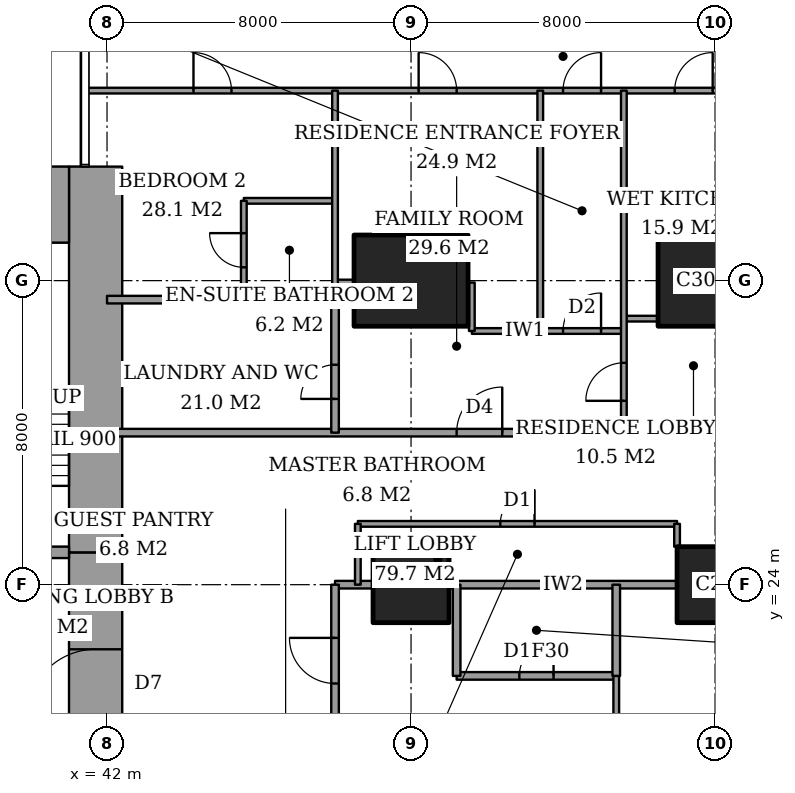
"""IFC4 building model, lengths in metres.
Left out: names, types, materials, properties, quantities, classifications, styles, units other than length and angle.
Written with IfcOpenShell. Run it as: python <this file> out.ifc"""

import sys

from ifc_helpers import new_model, si_unit, direction, frame, frame_2d, origin, origin_2d, place, context, subcontext, project, spatial, rectangle, extrude, element, fill, save


model = new_model("IFC4")
c1 = context("Model", 3, precision=1e-05, world=origin(), true_north=direction((0.0, 1.0)))
c2 = subcontext(c1, "Body", "Model", "MODEL_VIEW")
j1 = project(units=[si_unit("LENGTHUNIT", "METRE"), si_unit("PLANEANGLEUNIT", "RADIAN")], contexts=[c1])
p1 = place(None, origin())
s1 = spatial("IfcSite", under=j1, at=p1, CompositionType="ELEMENT")
p2 = place(p1, origin())
s2 = spatial("IfcBuilding", under=s1, at=p2, CompositionType="ELEMENT")
p3 = place(p2, frame((0.0, 0.0, 51.2)))
s3 = spatial("IfcBuildingStorey", under=s2, at=p3, CompositionType="ELEMENT", Elevation=51.2)
p4 = place(p3, frame((50.0, 24.0, 0.0), z_axis=(0.0, 0.0, 1.0), x_axis=(1.0, 0.0, 0.0)))
e1 = element("IfcColumn", 1, at=p4, inside=s3, PredefinedType="COLUMN", context=c2, shape_type="SweptSolid", body=[
    extrude(rectangle(XDim=2.0, YDim=2.0, at=origin_2d()), origin(), (0.0, 0.0, 1.0), 3.6),
])
p5 = place(p3, frame((50.0, 32.0, 0.0), z_axis=(0.0, 0.0, 1.0), x_axis=(1.0, 0.0, 0.0)))
e2 = element("IfcColumn", 2, at=p5, inside=s3, PredefinedType="COLUMN", context=c2, shape_type="SweptSolid", body=[
    extrude(rectangle(XDim=3.0, YDim=2.4, at=origin_2d()), origin(), (0.0, 0.0, 1.0), 3.6),
])
p6 = place(p3, frame((58.0, 24.0, 0.0), z_axis=(0.0, 0.0, 1.0), x_axis=(1.0, 0.0, 0.0)))
e3 = element("IfcColumn", 3, at=p6, inside=s3, PredefinedType="COLUMN", context=c2, shape_type="SweptSolid", body=[
    extrude(rectangle(XDim=2.0, YDim=2.0, at=origin_2d()), origin(), (0.0, 0.0, 1.0), 3.6),
])
p7 = place(p3, frame((58.0, 32.0, 0.0), z_axis=(0.0, 0.0, 1.0), x_axis=(1.0, 0.0, 0.0)))
e4 = element("IfcColumn", 4, at=p7, inside=s3, PredefinedType="COLUMN", context=c2, shape_type="SweptSolid", body=[
    extrude(rectangle(XDim=3.0, YDim=2.4, at=origin_2d()), origin(), (0.0, 0.0, 1.0), 3.6),
])
p8 = place(p3, frame((37.85, 34.0, 0.0), z_axis=(0.0, 0.0, 1.0), x_axis=(1.0, 0.0, 0.0)))
e5 = element("IfcWall", 5, at=p8, inside=s3, PredefinedType="SHEAR", context=c2, shape_type="SweptSolid", body=[
    extrude(rectangle(XDim=3.15, YDim=2.0, at=frame_2d((1.575, 0.0))), origin(), (0.0, 0.0, 1.0), 3.6),
])
p9 = place(p3, frame((41.7, 13.0, 0.0), z_axis=(0.0, 0.0, 1.0), x_axis=(0.0, 1.0, 0.0)))
e6 = element("IfcWall", 6, at=p9, inside=s3, PredefinedType="SHEAR", context=c2, shape_type="SweptSolid", body=[
    extrude(rectangle(XDim=11.85, YDim=1.4, at=frame_2d((5.925, 0.0))), origin(), (0.0, 0.0, 1.0), 3.6),
])
p10 = place(p9, frame((7.5, 0.0, 0.0)))
e7 = element("IfcOpeningElement", 7, at=p10, cuts=e6, PredefinedType="OPENING", context=c2, shape_type="SweptSolid", body=[
    extrude(rectangle(XDim=1.8, YDim=2.4, at=frame_2d((0.9, 1.2))), frame((0.0, 0.71, 0.0), z_axis=(0.0, -1.0, 0.0), x_axis=(1.0, 0.0, 0.0)), (0.0, 0.0, 1.0), 1.42),
])
p11 = place(p3, frame((41.7, 24.85, 0.0), z_axis=(0.0, 0.0, 1.0), x_axis=(0.0, 1.0, 0.0)))
e8 = element("IfcWall", 8, at=p11, inside=s3, PredefinedType="SHEAR", context=c2, shape_type="SweptSolid", body=[
    extrude(rectangle(XDim=10.15, YDim=1.4, at=frame_2d((5.075, 0.0))), origin(), (0.0, 0.0, 1.0), 3.6),
])
p12 = place(p3, frame((37.85, 24.85, 0.0), z_axis=(0.0, 0.0, 1.0), x_axis=(1.0, 0.0, 0.0)))
e9 = element("IfcWall", 9, at=p12, inside=s3, PredefinedType="SHEAR", context=c2, shape_type="SweptSolid", body=[
    extrude(rectangle(XDim=3.15, YDim=0.3, at=frame_2d((1.575, 0.0))), origin(), (0.0, 0.0, 1.0), 3.6),
])
p13 = place(p12, frame((0.95, 0.0, 0.0)))
e10 = element("IfcOpeningElement", 10, at=p13, cuts=e9, PredefinedType="OPENING", context=c2, shape_type="SweptSolid", body=[
    extrude(rectangle(XDim=1.0, YDim=2.1, at=frame_2d((0.5, 1.05))), frame((0.0, 0.16, 0.0), z_axis=(0.0, -1.0, 0.0), x_axis=(1.0, 0.0, 0.0)), (0.0, 0.0, 1.0), 0.32),
])
p14 = place(p3, frame((51.2, 21.6, 0.0), z_axis=(0.0, 0.0, 1.0), x_axis=(1.0, 0.0, 0.0)))
e11 = element("IfcWall", 11, at=p14, inside=s3, PredefinedType="PARTITIONING", context=c2, shape_type="SweptSolid", body=[
    extrude(rectangle(XDim=4.2, YDim=0.2, at=frame_2d((2.1, 0.0))), origin(), (0.0, 0.0, 1.0), 3.35),
])
p15 = place(p14, frame((1.65, 0.0, 0.0)))
e12 = element("IfcOpeningElement", 12, at=p15, cuts=e11, PredefinedType="OPENING", context=c2, shape_type="SweptSolid", body=[
    extrude(rectangle(XDim=0.9, YDim=2.1, at=frame_2d((0.45, 1.05))), frame((0.0, 0.11, 0.0), z_axis=(0.0, -1.0, 0.0), x_axis=(1.0, 0.0, 0.0)), (0.0, 0.0, 1.0), 0.22),
])
p16 = place(p3, frame((48.0, 24.0, 0.0), z_axis=(0.0, 0.0, 1.0), x_axis=(1.0, 0.0, 0.0)))
e13 = element("IfcWall", 13, at=p16, inside=s3, PredefinedType="PARTITIONING", context=c2, shape_type="SweptSolid", body=[
    extrude(rectangle(XDim=1.0, YDim=0.2, at=frame_2d((0.5, 0.0))), origin(), (0.0, 0.0, 1.0), 3.35),
])
p17 = place(p3, frame((51.0, 24.0, 0.0), z_axis=(0.0, 0.0, 1.0), x_axis=(1.0, 0.0, 0.0)))
e14 = element("IfcWall", 14, at=p17, inside=s3, PredefinedType="PARTITIONING", context=c2, shape_type="SweptSolid", body=[
    extrude(rectangle(XDim=6.0, YDim=0.2, at=frame_2d((3.0, 0.0))), origin(), (0.0, 0.0, 1.0), 3.35),
])
p18 = place(p3, frame((48.6, 25.6, 0.0), z_axis=(0.0, 0.0, 1.0), x_axis=(1.0, 0.0, 0.0)))
e15 = element("IfcWall", 15, at=p18, inside=s3, PredefinedType="PARTITIONING", context=c2, shape_type="SweptSolid", body=[
    extrude(rectangle(XDim=8.4, YDim=0.15, at=frame_2d((4.2, 0.0))), origin(), (0.0, 0.0, 1.0), 3.35),
])
p19 = place(p18, frame((3.75, 0.0, 0.0)))
e16 = element("IfcOpeningElement", 16, at=p19, cuts=e15, PredefinedType="OPENING", context=c2, shape_type="SweptSolid", body=[
    extrude(rectangle(XDim=0.9, YDim=2.1, at=frame_2d((0.45, 1.05))), frame((0.0, 0.085, 0.0), z_axis=(0.0, -1.0, 0.0), x_axis=(1.0, 0.0, 0.0)), (0.0, 0.0, 1.0), 0.17),
])
p20 = place(p3, frame((42.0, 28.0, 0.0), z_axis=(0.0, 0.0, 1.0), x_axis=(1.0, 0.0, 0.0)))
e17 = element("IfcWall", 17, at=p20, inside=s3, PredefinedType="PARTITIONING", context=c2, shape_type="SweptSolid", body=[
    extrude(rectangle(XDim=17.275, YDim=0.2, at=frame_2d((8.637, 0.0))), origin(), (0.0, 0.0, 1.0), 3.35),
])
p21 = place(p20, frame((9.2, 0.0, 0.0)))
e18 = element("IfcOpeningElement", 18, at=p21, cuts=e17, PredefinedType="OPENING", context=c2, shape_type="SweptSolid", body=[
    extrude(rectangle(XDim=1.2, YDim=2.4, at=frame_2d((0.6, 1.2))), frame((0.0, 0.11, 0.0), z_axis=(0.0, -1.0, 0.0), x_axis=(1.0, 0.0, 0.0)), (0.0, 0.0, 1.0), 0.22),
])
p22 = place(p3, frame((51.6, 30.675, 0.0), z_axis=(0.0, 0.0, 1.0), x_axis=(1.0, 0.0, 0.0)))
e19 = element("IfcWall", 19, at=p22, inside=s3, PredefinedType="PARTITIONING", context=c2, shape_type="SweptSolid", body=[
    extrude(rectangle(XDim=4.0, YDim=0.15, at=frame_2d((2.0, 0.0))), origin(), (0.0, 0.0, 1.0), 3.35),
])
p23 = place(p22, frame((2.4, 0.0, 0.0)))
e20 = element("IfcOpeningElement", 20, at=p23, cuts=e19, PredefinedType="OPENING", context=c2, shape_type="SweptSolid", body=[
    extrude(rectangle(XDim=1.0, YDim=2.1, at=frame_2d((0.5, 1.05))), frame((0.0, 0.085, 0.0), z_axis=(0.0, -1.0, 0.0), x_axis=(1.0, 0.0, 0.0)), (0.0, 0.0, 1.0), 0.17),
])
p24 = place(p3, frame((55.6, 31.0, 0.0), z_axis=(0.0, 0.0, 1.0), x_axis=(1.0, 0.0, 0.0)))
e21 = element("IfcWall", 21, at=p24, inside=s3, PredefinedType="PARTITIONING", context=c2, shape_type="SweptSolid", body=[
    extrude(rectangle(XDim=0.9, YDim=0.15, at=frame_2d((0.45, 0.0))), origin(), (0.0, 0.0, 1.0), 3.35),
])
p25 = place(p3, frame((42.0, 31.5, 0.0), z_axis=(0.0, 0.0, 1.0), x_axis=(1.0, 0.0, 0.0)))
e22 = element("IfcWall", 22, at=p25, inside=s3, PredefinedType="PARTITIONING", context=c2, shape_type="SweptSolid", body=[
    extrude(rectangle(XDim=6.0, YDim=0.2, at=frame_2d((3.0, 0.0))), origin(), (0.0, 0.0, 1.0), 3.35),
])
p26 = place(p3, frame((48.0, 31.95, 0.0), z_axis=(0.0, 0.0, 1.0), x_axis=(1.0, 0.0, 0.0)))
e23 = element("IfcWall", 23, at=p26, inside=s3, PredefinedType="PARTITIONING", context=c2, shape_type="SweptSolid", body=[
    extrude(rectangle(XDim=0.5, YDim=0.15, at=frame_2d((0.25, 0.0))), origin(), (0.0, 0.0, 1.0), 2.634),
])
p27 = place(p3, frame((45.6, 34.1, 0.0), z_axis=(0.0, 0.0, 1.0), x_axis=(1.0, 0.0, 0.0)))
e24 = element("IfcWall", 24, at=p27, inside=s3, PredefinedType="PARTITIONING", context=c2, shape_type="SweptSolid", body=[
    extrude(rectangle(XDim=2.4, YDim=0.15, at=frame_2d((1.2, 0.0))), origin(), (0.0, 0.0, 1.0), 3.35),
])
p28 = place(p3, frame((41.439, 37.0, 0.0), z_axis=(0.0, 0.0, 1.0), x_axis=(1.0, 0.0, 0.0)))
e25 = element("IfcWall", 25, at=p28, inside=s3, PredefinedType="PARTITIONING", context=c2, shape_type="SweptSolid", body=[
    extrude(rectangle(XDim=25.011, YDim=0.15, at=frame_2d((12.505, 0.0))), origin(), (0.0, 0.0, 1.0), 3.35),
])
p29 = place(p28, frame((12.561, 0.0, 0.0)))
e26 = element("IfcOpeningElement", 26, at=p29, cuts=e25, PredefinedType="OPENING", context=c2, shape_type="SweptSolid", body=[
    extrude(rectangle(XDim=1.0, YDim=2.1, at=frame_2d((0.5, 1.05))), frame((0.0, 0.085, 0.0), z_axis=(0.0, -1.0, 0.0), x_axis=(1.0, 0.0, 0.0)), (0.0, 0.0, 1.0), 0.17),
])
p30 = place(p28, frame((20.924, 0.0, 0.0)))
e27 = element("IfcOpeningElement", 27, at=p30, cuts=e25, PredefinedType="OPENING", context=c2, shape_type="SweptSolid", body=[
    extrude(rectangle(XDim=1.0, YDim=2.1, at=frame_2d((0.5, 1.05))), frame((0.0, 0.085, 0.0), z_axis=(0.0, -1.0, 0.0), x_axis=(1.0, 0.0, 0.0)), (0.0, 0.0, 1.0), 0.17),
])
p31 = place(p28, frame((15.499, 0.0, 0.0)))
e28 = element("IfcOpeningElement", 28, at=p31, cuts=e25, PredefinedType="OPENING", context=c2, shape_type="SweptSolid", body=[
    extrude(rectangle(XDim=1.0, YDim=2.1, at=frame_2d((0.5, 1.05))), frame((0.0, 0.085, 0.0), z_axis=(0.0, -1.0, 0.0), x_axis=(1.0, 0.0, 0.0)), (0.0, 0.0, 1.0), 0.17),
])
p32 = place(p28, frame((8.761, 0.0, 0.0)))
e29 = element("IfcOpeningElement", 29, at=p32, cuts=e25, PredefinedType="OPENING", context=c2, shape_type="SweptSolid", body=[
    extrude(rectangle(XDim=1.0, YDim=2.1, at=frame_2d((0.5, 1.05))), frame((0.0, 0.085, 0.0), z_axis=(0.0, -1.0, 0.0), x_axis=(1.0, 0.0, 0.0)), (0.0, 0.0, 1.0), 0.17),
])
p33 = place(p28, frame((2.836, 0.0, 0.0)))
e30 = element("IfcOpeningElement", 30, at=p33, cuts=e25, PredefinedType="OPENING", context=c2, shape_type="SweptSolid", body=[
    extrude(rectangle(XDim=1.0, YDim=2.1, at=frame_2d((0.5, 1.05))), frame((0.0, 0.085, 0.0), z_axis=(0.0, -1.0, 0.0), x_axis=(1.0, 0.0, 0.0)), (0.0, 0.0, 1.0), 0.17),
])
p34 = place(p3, frame((45.6, 31.5, 0.0), z_axis=(0.0, 0.0, 1.0), x_axis=(0.0, 1.0, 0.0)))
e31 = element("IfcWall", 31, at=p34, inside=s3, PredefinedType="PARTITIONING", context=c2, shape_type="SweptSolid", body=[
    extrude(rectangle(XDim=2.6, YDim=0.15, at=frame_2d((1.3, 0.0))), origin(), (0.0, 0.0, 1.0), 3.35),
])
p35 = place(p34, frame((0.85, 0.0, 0.0)))
e32 = element("IfcOpeningElement", 32, at=p35, cuts=e31, PredefinedType="OPENING", context=c2, shape_type="SweptSolid", body=[
    extrude(rectangle(XDim=0.9, YDim=2.1, at=frame_2d((0.45, 1.05))), frame((0.0, 0.085, 0.0), z_axis=(0.0, -1.0, 0.0), x_axis=(1.0, 0.0, 0.0)), (0.0, 0.0, 1.0), 0.17),
])
p36 = place(p3, frame((48.0, 17.5, 0.0), z_axis=(0.0, 0.0, 1.0), x_axis=(0.0, 1.0, 0.0)))
e33 = element("IfcWall", 33, at=p36, inside=s3, PredefinedType="PARTITIONING", context=c2, shape_type="SweptSolid", body=[
    extrude(rectangle(XDim=6.5, YDim=0.2, at=frame_2d((3.25, 0.0))), origin(), (0.0, 0.0, 1.0), 3.35),
])
p37 = place(p36, frame((3.9, 0.0, 0.0)))
e34 = element("IfcOpeningElement", 34, at=p37, cuts=e33, PredefinedType="OPENING", context=c2, shape_type="SweptSolid", body=[
    extrude(rectangle(XDim=1.2, YDim=2.4, at=frame_2d((0.6, 1.2))), frame((0.0, 0.11, 0.0), z_axis=(0.0, -1.0, 0.0), x_axis=(1.0, 0.0, 0.0)), (0.0, 0.0, 1.0), 0.22),
])
p38 = place(p36, frame((0.8, 0.0, 0.0)))
e35 = element("IfcOpeningElement", 35, at=p38, cuts=e33, PredefinedType="OPENING", context=c2, shape_type="SweptSolid", body=[
    extrude(rectangle(XDim=0.9, YDim=2.1, at=frame_2d((0.45, 1.05))), frame((0.0, 0.11, 0.0), z_axis=(0.0, -1.0, 0.0), x_axis=(1.0, 0.0, 0.0)), (0.0, 0.0, 1.0), 0.22),
])
p39 = place(p3, frame((48.0, 28.0, 0.0), z_axis=(0.0, 0.0, 1.0), x_axis=(0.0, 1.0, 0.0)))
e36 = element("IfcWall", 36, at=p39, inside=s3, PredefinedType="PARTITIONING", context=c2, shape_type="SweptSolid", body=[
    extrude(rectangle(XDim=3.5, YDim=0.2, at=frame_2d((1.75, 0.0))), origin(), (0.0, 0.0, 1.0), 3.35),
])
p40 = place(p39, frame((0.887, 0.0, 0.0)))
e37 = element("IfcOpeningElement", 37, at=p40, cuts=e36, PredefinedType="OPENING", context=c2, shape_type="SweptSolid", body=[
    extrude(rectangle(XDim=0.9, YDim=2.1, at=frame_2d((0.45, 1.05))), frame((0.0, 0.11, 0.0), z_axis=(0.0, -1.0, 0.0), x_axis=(1.0, 0.0, 0.0)), (0.0, 0.0, 1.0), 0.22),
])
p41 = place(p3, frame((48.0, 31.5, 0.0), z_axis=(0.0, 0.0, 1.0), x_axis=(0.0, 1.0, 0.0)))
e38 = element("IfcWall", 38, at=p41, inside=s3, PredefinedType="PARTITIONING", context=c2, shape_type="SweptSolid", body=[
    extrude(rectangle(XDim=5.5, YDim=0.15, at=frame_2d((2.75, 0.0))), origin(), (0.0, 0.0, 1.0), 3.35),
])
p42 = place(p3, frame((48.6, 24.0, 0.0), z_axis=(0.0, 0.0, 1.0), x_axis=(0.0, 1.0, 0.0)))
e39 = element("IfcWall", 39, at=p42, inside=s3, PredefinedType="PARTITIONING", context=c2, shape_type="SweptSolid", body=[
    extrude(rectangle(XDim=1.6, YDim=0.15, at=frame_2d((0.8, 0.0))), origin(), (0.0, 0.0, 1.0), 3.35),
])
p43 = place(p3, frame((51.2, 21.6, 0.0), z_axis=(0.0, 0.0, 1.0), x_axis=(0.0, 1.0, 0.0)))
e40 = element("IfcWall", 40, at=p43, inside=s3, PredefinedType="PARTITIONING", context=c2, shape_type="SweptSolid", body=[
    extrude(rectangle(XDim=2.4, YDim=0.2, at=frame_2d((1.2, 0.0))), origin(), (0.0, 0.0, 1.0), 3.35),
])
p44 = place(p3, frame((51.6, 30.675, 0.0), z_axis=(0.0, 0.0, 1.0), x_axis=(0.0, 1.0, 0.0)))
e41 = element("IfcWall", 41, at=p44, inside=s3, PredefinedType="PARTITIONING", context=c2, shape_type="SweptSolid", body=[
    extrude(rectangle(XDim=1.275, YDim=0.15, at=frame_2d((0.637, 0.0))), origin(), (0.0, 0.0, 1.0), 3.35),
])
p45 = place(p3, frame((53.4, 30.675, 0.0), z_axis=(0.0, 0.0, 1.0), x_axis=(0.0, 1.0, 0.0)))
e42 = element("IfcWall", 42, at=p45, inside=s3, PredefinedType="PARTITIONING", context=c2, shape_type="SweptSolid", body=[
    extrude(rectangle(XDim=6.325, YDim=0.15, at=frame_2d((3.163, 0.0))), origin(), (0.0, 0.0, 1.0), 3.35),
])
p46 = place(p3, frame((55.4, 21.6, 0.0), z_axis=(0.0, 0.0, 1.0), x_axis=(0.0, 1.0, 0.0)))
e43 = element("IfcWall", 43, at=p46, inside=s3, PredefinedType="PARTITIONING", context=c2, shape_type="SweptSolid", body=[
    extrude(rectangle(XDim=2.4, YDim=0.2, at=frame_2d((1.2, 0.0))), origin(), (0.0, 0.0, 1.0), 3.35),
])
p47 = place(p3, frame((55.4, 10.8, 0.0), z_axis=(0.0, 0.0, 1.0), x_axis=(0.0, 1.0, 0.0)))
e44 = element("IfcWall", 44, at=p47, inside=s3, PredefinedType="PARTITIONING", context=c2, shape_type="SweptSolid", body=[
    extrude(rectangle(XDim=10.8, YDim=0.15, at=frame_2d((5.4, 0.0))), origin(), (0.0, 0.0, 1.0), 3.35),
])
p48 = place(p47, frame((8.25, 0.0, 0.0)))
e45 = element("IfcOpeningElement", 45, at=p48, cuts=e44, PredefinedType="OPENING", context=c2, shape_type="SweptSolid", body=[
    extrude(rectangle(XDim=1.0, YDim=2.1, at=frame_2d((0.5, 1.05))), frame((0.0, 0.085, 0.0), z_axis=(0.0, -1.0, 0.0), x_axis=(1.0, 0.0, 0.0)), (0.0, 0.0, 1.0), 0.17),
])
p49 = place(p3, frame((55.6, 28.0, 0.0), z_axis=(0.0, 0.0, 1.0), x_axis=(0.0, 1.0, 0.0)))
e46 = element("IfcWall", 46, at=p49, inside=s3, PredefinedType="PARTITIONING", context=c2, shape_type="SweptSolid", body=[
    extrude(rectangle(XDim=9.0, YDim=0.15, at=frame_2d((4.5, 0.0))), origin(), (0.0, 0.0, 1.0), 3.35),
])
p50 = place(p49, frame((0.837, 0.0, 0.0)))
e47 = element("IfcOpeningElement", 47, at=p50, cuts=e46, PredefinedType="OPENING", context=c2, shape_type="SweptSolid", body=[
    extrude(rectangle(XDim=1.0, YDim=2.1, at=frame_2d((0.5, 1.05))), frame((0.0, 0.085, 0.0), z_axis=(0.0, -1.0, 0.0), x_axis=(1.0, 0.0, 0.0)), (0.0, 0.0, 1.0), 0.17),
])
p51 = place(p3, frame((57.0, 25.0, 0.0), z_axis=(0.0, 0.0, 1.0), x_axis=(0.0, 1.0, 0.0)))
e48 = element("IfcWall", 48, at=p51, inside=s3, PredefinedType="PARTITIONING", context=c2, shape_type="SweptSolid", body=[
    extrude(rectangle(XDim=0.6, YDim=0.15, at=frame_2d((0.3, 0.0))), origin(), (0.0, 0.0, 1.0), 3.35),
])
p52 = place(p15, origin())
e49 = element("IfcDoor", 49, at=p52, inside=s3, OperationType="SINGLE_SWING_LEFT", PredefinedType="DOOR", context=c2, shape_type="SweptSolid", body=[
    extrude(rectangle(XDim=0.9, YDim=2.1, at=frame_2d((0.45, 1.05))), frame((0.0, 0.025, 0.0), z_axis=(0.0, -1.0, 0.0), x_axis=(1.0, 0.0, 0.0)), (0.0, 0.0, 1.0), 0.05),
])
fill(e12, e49)
p53 = place(p37, origin())
e50 = element("IfcDoor", 50, at=p53, inside=s3, OperationType="SINGLE_SWING_LEFT", PredefinedType="DOOR", context=c2, shape_type="SweptSolid", body=[
    extrude(rectangle(XDim=1.2, YDim=2.4, at=frame_2d((0.6, 1.2))), frame((0.0, 0.025, 0.0), z_axis=(0.0, -1.0, 0.0), x_axis=(1.0, 0.0, 0.0)), (0.0, 0.0, 1.0), 0.05),
])
fill(e34, e50)
p54 = place(p29, origin())
e51 = element("IfcDoor", 51, at=p54, inside=s3, OperationType="SINGLE_SWING_LEFT", PredefinedType="DOOR", context=c2, shape_type="SweptSolid", body=[
    extrude(rectangle(XDim=1.0, YDim=2.1, at=frame_2d((0.5, 1.05))), frame((0.0, 0.025, 0.0), z_axis=(0.0, -1.0, 0.0), x_axis=(1.0, 0.0, 0.0)), (0.0, 0.0, 1.0), 0.05),
])
fill(e26, e51)
p55 = place(p31, origin())
e52 = element("IfcDoor", 52, at=p55, inside=s3, OperationType="SINGLE_SWING_LEFT", PredefinedType="DOOR", context=c2, shape_type="SweptSolid", body=[
    extrude(rectangle(XDim=1.0, YDim=2.1, at=frame_2d((0.5, 1.05))), frame((0.0, 0.025, 0.0), z_axis=(0.0, -1.0, 0.0), x_axis=(1.0, 0.0, 0.0)), (0.0, 0.0, 1.0), 0.05),
])
fill(e28, e52)
p56 = place(p50, origin())
e53 = element("IfcDoor", 53, at=p56, inside=s3, OperationType="SINGLE_SWING_RIGHT", PredefinedType="DOOR", context=c2, shape_type="SweptSolid", body=[
    extrude(rectangle(XDim=1.0, YDim=2.1, at=frame_2d((0.5, 1.05))), frame((0.0, 0.025, 0.0), z_axis=(0.0, -1.0, 0.0), x_axis=(1.0, 0.0, 0.0)), (0.0, 0.0, 1.0), 0.05),
])
fill(e47, e53)
p57 = place(p21, origin())
e54 = element("IfcDoor", 54, at=p57, inside=s3, OperationType="SINGLE_SWING_LEFT", PredefinedType="DOOR", context=c2, shape_type="SweptSolid", body=[
    extrude(rectangle(XDim=1.2, YDim=2.4, at=frame_2d((0.6, 1.2))), frame((0.0, 0.025, 0.0), z_axis=(0.0, -1.0, 0.0), x_axis=(1.0, 0.0, 0.0)), (0.0, 0.0, 1.0), 0.05),
])
fill(e18, e54)
p58 = place(p23, origin())
e55 = element("IfcDoor", 55, at=p58, inside=s3, OperationType="SINGLE_SWING_LEFT", PredefinedType="DOOR", context=c2, shape_type="SweptSolid", body=[
    extrude(rectangle(XDim=1.0, YDim=2.1, at=frame_2d((0.5, 1.05))), frame((0.0, 0.025, 0.0), z_axis=(0.0, -1.0, 0.0), x_axis=(1.0, 0.0, 0.0)), (0.0, 0.0, 1.0), 0.05),
])
fill(e20, e55)
p59 = place(p32, origin())
e56 = element("IfcDoor", 56, at=p59, inside=s3, OperationType="SINGLE_SWING_RIGHT", PredefinedType="DOOR", context=c2, shape_type="SweptSolid", body=[
    extrude(rectangle(XDim=1.0, YDim=2.1, at=frame_2d((0.5, 1.05))), frame((0.0, 0.025, 0.0), z_axis=(0.0, -1.0, 0.0), x_axis=(1.0, 0.0, 0.0)), (0.0, 0.0, 1.0), 0.05),
])
fill(e29, e56)
p60 = place(p35, origin())
e57 = element("IfcDoor", 57, at=p60, inside=s3, OperationType="SINGLE_SWING_LEFT", PredefinedType="DOOR", context=c2, shape_type="SweptSolid", body=[
    extrude(rectangle(XDim=0.9, YDim=2.1, at=frame_2d((0.45, 1.05))), frame((0.0, 0.025, 0.0), z_axis=(0.0, -1.0, 0.0), x_axis=(1.0, 0.0, 0.0)), (0.0, 0.0, 1.0), 0.05),
])
fill(e32, e57)
p61 = place(p33, origin())
e58 = element("IfcDoor", 58, at=p61, inside=s3, OperationType="SINGLE_SWING_RIGHT", PredefinedType="DOOR", context=c2, shape_type="SweptSolid", body=[
    extrude(rectangle(XDim=1.0, YDim=2.1, at=frame_2d((0.5, 1.05))), frame((0.0, 0.025, 0.0), z_axis=(0.0, -1.0, 0.0), x_axis=(1.0, 0.0, 0.0)), (0.0, 0.0, 1.0), 0.05),
])
fill(e30, e58)
p62 = place(p40, origin())
e59 = element("IfcDoor", 59, at=p62, inside=s3, OperationType="SINGLE_SWING_RIGHT", PredefinedType="DOOR", context=c2, shape_type="SweptSolid", body=[
    extrude(rectangle(XDim=0.9, YDim=2.1, at=frame_2d((0.45, 1.05))), frame((0.0, 0.025, 0.0), z_axis=(0.0, -1.0, 0.0), x_axis=(1.0, 0.0, 0.0)), (0.0, 0.0, 1.0), 0.05),
])
fill(e37, e59)
p63 = place(p19, origin())
e60 = element("IfcDoor", 60, at=p63, inside=s3, OperationType="SINGLE_SWING_LEFT", PredefinedType="DOOR", context=c2, shape_type="SweptSolid", body=[
    extrude(rectangle(XDim=0.9, YDim=2.1, at=frame_2d((0.45, 1.05))), frame((0.0, 0.025, 0.0), z_axis=(0.0, -1.0, 0.0), x_axis=(1.0, 0.0, 0.0)), (0.0, 0.0, 1.0), 0.05),
])
fill(e16, e60)
p64 = place(p10, origin())
e61 = element("IfcDoor", 61, at=p64, inside=s3, OperationType="DOUBLE_DOOR_DOUBLE_SWING", PredefinedType="DOOR", context=c2, shape_type="SweptSolid", body=[
    extrude(rectangle(XDim=1.8, YDim=2.4, at=frame_2d((0.9, 1.2))), frame((0.0, 0.025, 0.0), z_axis=(0.0, -1.0, 0.0), x_axis=(1.0, 0.0, 0.0)), (0.0, 0.0, 1.0), 0.05),
])
fill(e7, e61)
save(model, sys.argv[1])
